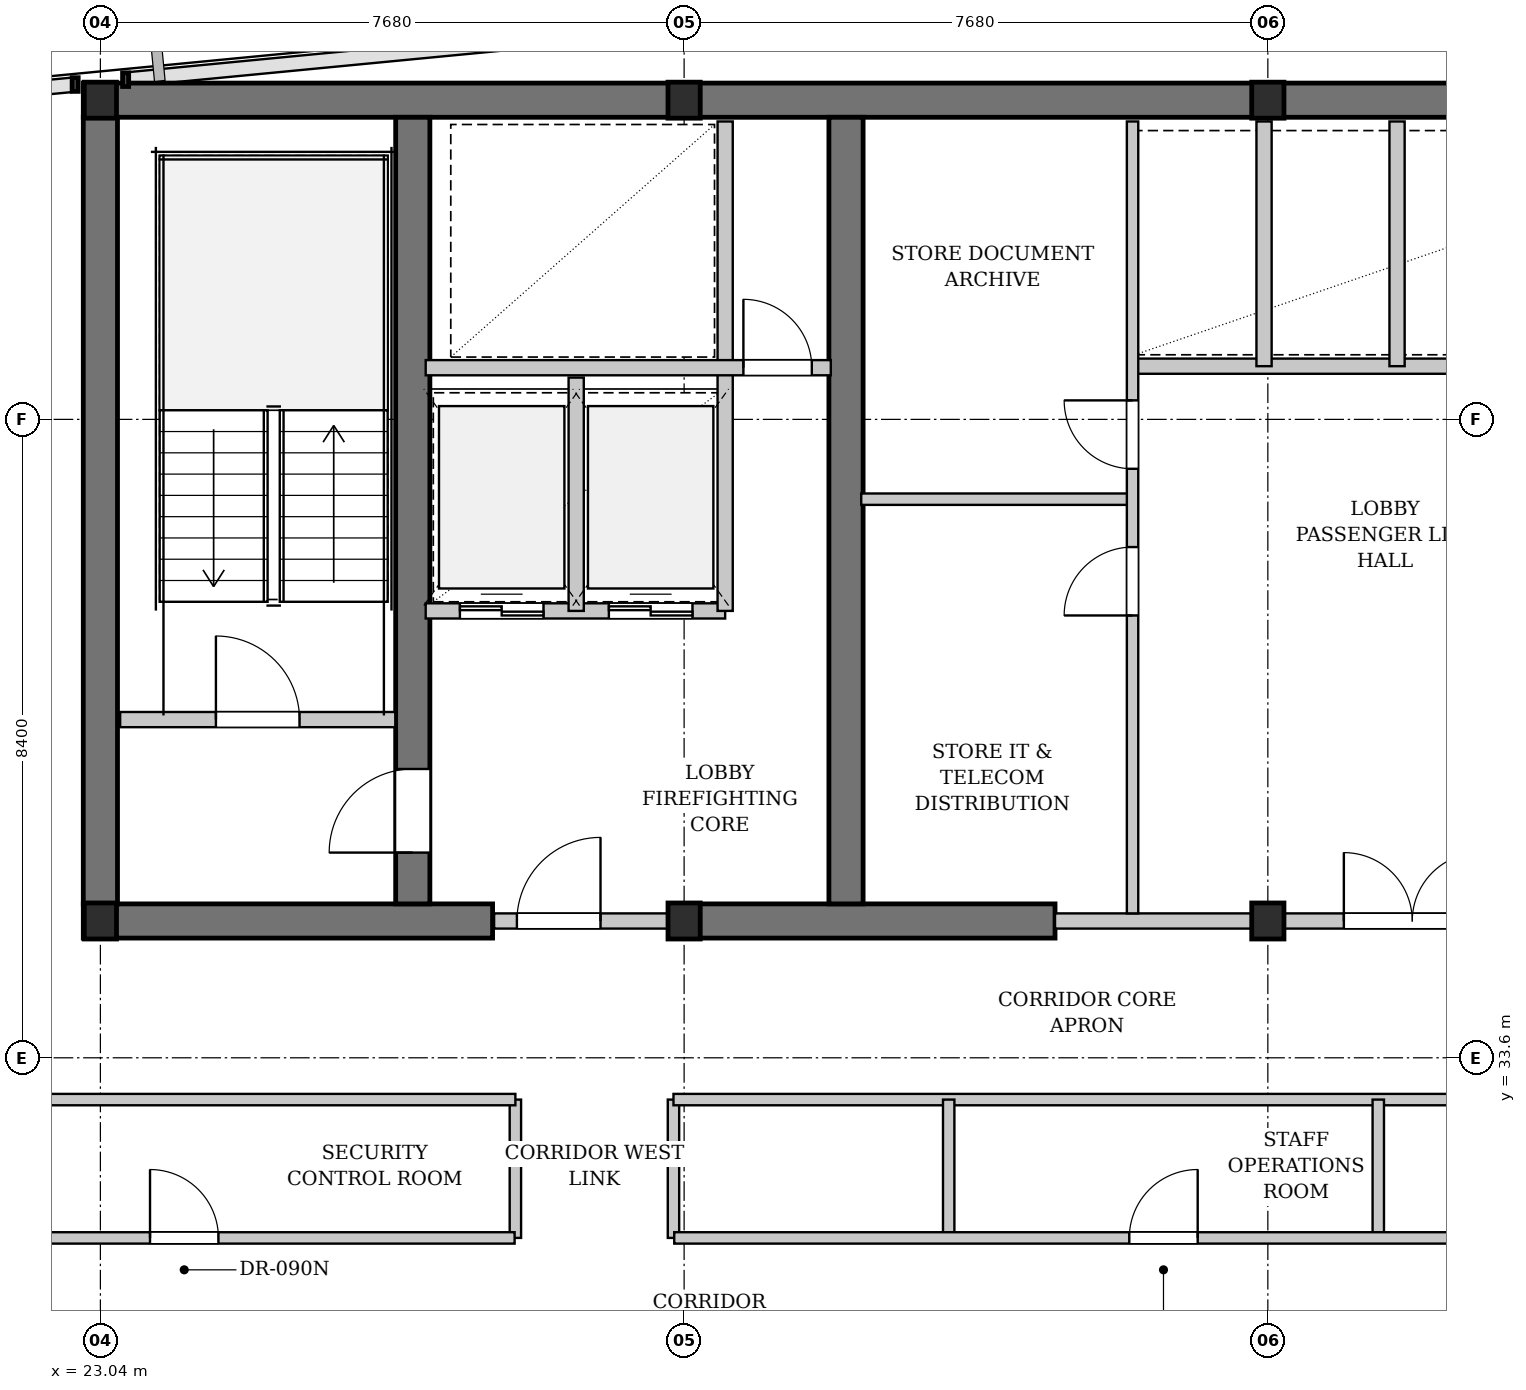
"""IFC4 building model, lengths in metres.
Left out: names, types, materials, properties, quantities, classifications, styles, units other than length and angle.
Written with IfcOpenShell. Run it as: python <this file> out.ifc"""

import sys

from ifc_helpers import new_model, si_unit, direction, frame, frame_2d, origin, origin_2d, place, context, subcontext, project, spatial, rectangle, i_section, extrude, element, fill, save


model = new_model("IFC4")
c1 = context("Model", 3, precision=1e-05, world=origin(), true_north=direction((0.0, 1.0)))
c2 = subcontext(c1, "Body", "Model", "MODEL_VIEW")
j1 = project(units=[si_unit("LENGTHUNIT", "METRE"), si_unit("PLANEANGLEUNIT", "RADIAN")], contexts=[c1])
p1 = place(None, origin())
s1 = spatial("IfcSite", under=j1, at=p1, CompositionType="ELEMENT")
p2 = place(p1, origin())
s2 = spatial("IfcBuilding", under=s1, at=p2, CompositionType="ELEMENT")
p3 = place(p2, frame((0.0, 0.0, 113.5)))
s3 = spatial("IfcBuildingStorey", under=s2, at=p3, CompositionType="ELEMENT", Elevation=113.5)
p4 = place(p3, frame((22.815, 46.2, 0.0), z_axis=(0.0, 0.0, 1.0), x_axis=(1.0, 0.0, 0.0)))
e1 = element("IfcWall", 1, at=p4, inside=s3, PredefinedType="SHEAR", context=c2, shape_type="SweptSolid", body=[
    extrude(rectangle(XDim=31.17, YDim=0.45, at=frame_2d((15.585, 0.0))), origin(), (0.0, 0.0, 1.0), 3.18),
])
p5 = place(p3, frame((22.815, 35.4, 0.0), z_axis=(0.0, 0.0, 1.0), x_axis=(1.0, 0.0, 0.0)))
e2 = element("IfcWall", 2, at=p5, inside=s3, PredefinedType="SHEAR", context=c2, shape_type="SweptSolid", body=[
    extrude(rectangle(XDim=5.385, YDim=0.45, at=frame_2d((2.692, 0.0))), origin(), (0.0, 0.0, 1.0), 3.18),
])
p6 = place(p3, frame((30.72, 35.4, 0.0), z_axis=(0.0, 0.0, 1.0), x_axis=(1.0, 0.0, 0.0)))
e3 = element("IfcWall", 3, at=p6, inside=s3, PredefinedType="SHEAR", context=c2, shape_type="SweptSolid", body=[
    extrude(rectangle(XDim=4.88, YDim=0.45, at=frame_2d((2.44, 0.0))), origin(), (0.0, 0.0, 1.0), 3.18),
])
p7 = place(p3, frame((23.04, 35.625, 0.0), z_axis=(0.0, 0.0, 1.0), x_axis=(0.0, 1.0, 0.0)))
e4 = element("IfcWall", 4, at=p7, inside=s3, PredefinedType="SHEAR", context=c2, shape_type="SweptSolid", body=[
    extrude(rectangle(XDim=10.35, YDim=0.45, at=frame_2d((5.175, 0.0))), origin(), (0.0, 0.0, 1.0), 3.18),
])
p8 = place(p3, frame((27.15, 35.625, 0.0), z_axis=(0.0, 0.0, 1.0), x_axis=(0.0, 1.0, 0.0)))
e5 = element("IfcWall", 5, at=p8, inside=s3, PredefinedType="SHEAR", context=c2, shape_type="SweptSolid", body=[
    extrude(rectangle(XDim=10.35, YDim=0.45, at=frame_2d((5.175, 0.0))), origin(), (0.0, 0.0, 1.0), 3.18),
])
p9 = place(p8, frame((0.675, 0.0, 0.0)))
e6 = element("IfcOpeningElement", 6, at=p9, cuts=e5, PredefinedType="OPENING", context=c2, shape_type="SweptSolid", body=[
    extrude(rectangle(XDim=1.1, YDim=2.15, at=frame_2d((0.55, 1.075))), frame((0.0, 0.235, 0.0), z_axis=(0.0, -1.0, 0.0), x_axis=(1.0, 0.0, 0.0)), (0.0, 0.0, 1.0), 0.47),
])
p10 = place(p3, frame((32.85, 35.625, 0.0), z_axis=(0.0, 0.0, 1.0), x_axis=(0.0, 1.0, 0.0)))
e7 = element("IfcWall", 7, at=p10, inside=s3, PredefinedType="SHEAR", context=c2, shape_type="SweptSolid", body=[
    extrude(rectangle(XDim=10.35, YDim=0.45, at=frame_2d((5.175, 0.0))), origin(), (0.0, 0.0, 1.0), 3.18),
])
for number, where, z_axis, x_axis in (
    (8, (23.04, 35.4, 0.0), (0.0, 0.0, 1.0), (1.0, 0.0, 0.0)),
    (9, (23.04, 46.2, 0.0), (0.0, 0.0, 1.0), (1.0, 0.0, 0.0)),
    (10, (30.72, 35.4, 0.0), (0.0, 0.0, 1.0), (1.0, 0.0, 0.0)),
    (11, (30.72, 46.2, 0.0), (0.0, 0.0, 1.0), (1.0, 0.0, 0.0)),
    (12, (38.4, 35.4, 0.0), (0.0, 0.0, 1.0), (1.0, 0.0, 0.0)),
    (13, (38.4, 46.2, 0.0), (0.0, 0.0, 1.0), (1.0, 0.0, 0.0)),
):
    element("IfcColumn", number, at=place(p3, frame(where, z_axis=z_axis, x_axis=x_axis)), inside=s3, PredefinedType="COLUMN", context=c2, shape_type="SweptSolid", body=[
        extrude(i_section(OverallWidth=0.424, OverallDepth=0.474, WebThickness=0.047, FlangeThickness=0.077, FilletRadius=0.015, at=origin_2d()), origin(), (0.0, 0.0, 1.0), 3.4),
    ])
p11 = place(p3, frame((23.3, 38.05, 0.0), z_axis=(0.0, 0.0, 1.0), x_axis=(1.0, 0.0, 0.0)))
e14 = element("IfcWall", 14, at=p11, inside=s3, PredefinedType="PARTITIONING", context=c2, shape_type="SweptSolid", body=[
    extrude(rectangle(XDim=3.62, YDim=0.2, at=frame_2d((1.81, 0.0))), origin(), (0.0, 0.0, 1.0), 3.18),
])
p12 = place(p11, frame((1.26, 0.0, 0.0)))
e15 = element("IfcOpeningElement", 15, at=p12, cuts=e14, PredefinedType="OPENING", context=c2, shape_type="SweptSolid", body=[
    extrude(rectangle(XDim=1.1, YDim=2.15, at=frame_2d((0.55, 1.075))), frame((0.0, 0.11, 0.0), z_axis=(0.0, -1.0, 0.0), x_axis=(1.0, 0.0, 0.0)), (0.0, 0.0, 1.0), 0.22),
])
p13 = place(p3, frame((28.22, 35.4, 0.0), z_axis=(0.0, 0.0, 1.0), x_axis=(1.0, 0.0, 0.0)))
e16 = element("IfcWall", 16, at=p13, inside=s3, PredefinedType="PARTITIONING", context=c2, shape_type="SweptSolid", body=[
    extrude(rectangle(XDim=2.5, YDim=0.2, at=frame_2d((1.25, 0.0))), origin(), (0.0, 0.0, 1.0), 2.525),
])
p14 = place(p13, frame((0.3, 0.0, 0.0)))
e17 = element("IfcOpeningElement", 17, at=p14, cuts=e16, PredefinedType="OPENING", context=c2, shape_type="SweptSolid", body=[
    extrude(rectangle(XDim=1.1, YDim=2.15, at=frame_2d((0.55, 1.075))), frame((0.0, 0.11, 0.0), z_axis=(0.0, -1.0, 0.0), x_axis=(1.0, 0.0, 0.0)), (0.0, 0.0, 1.0), 0.22),
])
p15 = place(p3, frame((27.32, 39.48, 0.0), z_axis=(0.0, 0.0, 1.0), x_axis=(1.0, 0.0, 0.0)))
e18 = element("IfcWall", 18, at=p15, inside=s3, PredefinedType="PARTITIONING", context=c2, shape_type="SweptSolid", body=[
    extrude(rectangle(XDim=3.94, YDim=0.2, at=frame_2d((1.97, 0.0))), origin(), (0.0, 0.0, 1.0), 3.18),
])
p16 = place(p15, frame((0.45, 0.0, 0.0)))
e19 = element("IfcOpeningElement", 19, at=p16, cuts=e18, PredefinedType="OPENING", context=c2, shape_type="SweptSolid", body=[
    extrude(rectangle(XDim=1.1, YDim=2.2, at=frame_2d((0.55, 1.1))), frame((0.0, 0.11, 0.0), z_axis=(0.0, -1.0, 0.0), x_axis=(1.0, 0.0, 0.0)), (0.0, 0.0, 1.0), 0.22),
])
p17 = place(p15, frame((2.41, 0.0, 0.0)))
e20 = element("IfcOpeningElement", 20, at=p17, cuts=e18, PredefinedType="OPENING", context=c2, shape_type="SweptSolid", body=[
    extrude(rectangle(XDim=1.1, YDim=2.2, at=frame_2d((0.55, 1.1))), frame((0.0, 0.11, 0.0), z_axis=(0.0, -1.0, 0.0), x_axis=(1.0, 0.0, 0.0)), (0.0, 0.0, 1.0), 0.22),
])
p18 = place(p3, frame((29.3, 39.48, 0.0), z_axis=(0.0, 0.0, 1.0), x_axis=(0.0, 1.0, 0.0)))
e21 = element("IfcWall", 21, at=p18, inside=s3, PredefinedType="PARTITIONING", context=c2, shape_type="SweptSolid", body=[
    extrude(rectangle(XDim=3.07, YDim=0.2, at=frame_2d((1.535, 0.0))), origin(), (0.0, 0.0, 1.0), 3.18),
])
p19 = place(p3, frame((31.26, 39.48, 0.0), z_axis=(0.0, 0.0, 1.0), x_axis=(0.0, 1.0, 0.0)))
e22 = element("IfcWall", 22, at=p19, inside=s3, PredefinedType="PARTITIONING", context=c2, shape_type="SweptSolid", body=[
    extrude(rectangle(XDim=6.44, YDim=0.2, at=frame_2d((3.22, 0.0))), origin(), (0.0, 0.0, 1.0), 3.18),
])
p20 = place(p3, frame((27.32, 42.68, 0.0), z_axis=(0.0, 0.0, 1.0), x_axis=(1.0, 0.0, 0.0)))
e23 = element("IfcWall", 23, at=p20, inside=s3, PredefinedType="PARTITIONING", context=c2, shape_type="SweptSolid", body=[
    extrude(rectangle(XDim=5.33, YDim=0.2, at=frame_2d((2.665, 0.0))), origin(), (0.0, 0.0, 1.0), 3.18),
])
p21 = place(p20, frame((4.18, 0.0, 0.0)))
e24 = element("IfcOpeningElement", 24, at=p21, cuts=e23, PredefinedType="OPENING", context=c2, shape_type="SweptSolid", body=[
    extrude(rectangle(XDim=0.9, YDim=2.15, at=frame_2d((0.45, 1.075))), frame((0.0, 0.11, 0.0), z_axis=(0.0, -1.0, 0.0), x_axis=(1.0, 0.0, 0.0)), (0.0, 0.0, 1.0), 0.22),
])
p22 = place(p3, frame((35.6, 35.4, 0.0), z_axis=(0.0, 0.0, 1.0), x_axis=(1.0, 0.0, 0.0)))
e25 = element("IfcWall", 25, at=p22, inside=s3, PredefinedType="PARTITIONING", context=c2, shape_type="SweptSolid", body=[
    extrude(rectangle(XDim=6.5, YDim=0.2, at=frame_2d((3.25, 0.0))), origin(), (0.0, 0.0, 1.0), 2.525),
])
p23 = place(p22, frame((3.8, 0.0, 0.0)))
e26 = element("IfcOpeningElement", 26, at=p23, cuts=e25, PredefinedType="OPENING", context=c2, shape_type="SweptSolid", body=[
    extrude(rectangle(XDim=1.8, YDim=2.3, at=frame_2d((0.9, 1.15))), frame((0.0, 0.11, 0.0), z_axis=(0.0, -1.0, 0.0), x_axis=(1.0, 0.0, 0.0)), (0.0, 0.0, 1.0), 0.22),
])
p24 = place(p3, frame((36.6, 42.7, 0.0), z_axis=(0.0, 0.0, 1.0), x_axis=(1.0, 0.0, 0.0)))
e27 = element("IfcWall", 27, at=p24, inside=s3, PredefinedType="PARTITIONING", context=c2, shape_type="SweptSolid", body=[
    extrude(rectangle(XDim=5.25, YDim=0.2, at=frame_2d((2.625, 0.0))), origin(), (0.0, 0.0, 1.0), 3.18),
])
p25 = place(p3, frame((38.35, 42.7, 0.0), z_axis=(0.0, 0.0, 1.0), x_axis=(0.0, 1.0, 0.0)))
e28 = element("IfcWall", 28, at=p25, inside=s3, PredefinedType="PARTITIONING", context=c2, shape_type="SweptSolid", body=[
    extrude(rectangle(XDim=3.22, YDim=0.2, at=frame_2d((1.61, 0.0))), origin(), (0.0, 0.0, 1.0), 2.525),
])
p26 = place(p3, frame((40.1, 42.7, 0.0), z_axis=(0.0, 0.0, 1.0), x_axis=(0.0, 1.0, 0.0)))
e29 = element("IfcWall", 29, at=p26, inside=s3, PredefinedType="PARTITIONING", context=c2, shape_type="SweptSolid", body=[
    extrude(rectangle(XDim=3.22, YDim=0.2, at=frame_2d((1.61, 0.0))), origin(), (0.0, 0.0, 1.0), 3.18),
])
p27 = place(p3, frame((33.05, 40.95, 0.0), z_axis=(0.0, 0.0, 1.0), x_axis=(1.0, 0.0, 0.0)))
e30 = element("IfcWall", 30, at=p27, inside=s3, PredefinedType="PARTITIONING", context=c2, shape_type="SweptSolid", body=[
    extrude(rectangle(XDim=3.57, YDim=0.15, at=frame_2d((1.785, 0.0))), origin(), (0.0, 0.0, 1.0), 3.18),
])
p28 = place(p3, frame((36.62, 35.5, 0.0), z_axis=(0.0, 0.0, 1.0), x_axis=(0.0, 1.0, 0.0)))
e31 = element("IfcWall", 31, at=p28, inside=s3, PredefinedType="PARTITIONING", context=c2, shape_type="SweptSolid", body=[
    extrude(rectangle(XDim=10.42, YDim=0.15, at=frame_2d((5.21, 0.0))), origin(), (0.0, 0.0, 1.0), 3.18),
])
p29 = place(p28, frame((3.92, 0.0, 0.0)))
e32 = element("IfcOpeningElement", 32, at=p29, cuts=e31, PredefinedType="OPENING", context=c2, shape_type="SweptSolid", body=[
    extrude(rectangle(XDim=0.9, YDim=2.15, at=frame_2d((0.45, 1.075))), frame((0.0, 0.085, 0.0), z_axis=(0.0, -1.0, 0.0), x_axis=(1.0, 0.0, 0.0)), (0.0, 0.0, 1.0), 0.17),
])
p30 = place(p28, frame((5.85, 0.0, 0.0)))
e33 = element("IfcOpeningElement", 33, at=p30, cuts=e31, PredefinedType="OPENING", context=c2, shape_type="SweptSolid", body=[
    extrude(rectangle(XDim=0.9, YDim=2.15, at=frame_2d((0.45, 1.075))), frame((0.0, 0.085, 0.0), z_axis=(0.0, -1.0, 0.0), x_axis=(1.0, 0.0, 0.0)), (0.0, 0.0, 1.0), 0.17),
])
p31 = place(p3, frame((28.5, 31.23, 0.0), z_axis=(0.0, 0.0, 1.0), x_axis=(0.0, 1.0, 0.0)))
e34 = element("IfcWall", 34, at=p31, inside=s3, PredefinedType="PARTITIONING", context=c2, shape_type="SweptSolid", body=[
    extrude(rectangle(XDim=1.82, YDim=0.15, at=frame_2d((0.91, 0.0))), origin(), (0.0, 0.0, 1.0), 3.18),
])
p32 = place(p3, frame((30.58, 31.23, 0.0), z_axis=(0.0, 0.0, 1.0), x_axis=(0.0, 1.0, 0.0)))
e35 = element("IfcWall", 35, at=p32, inside=s3, PredefinedType="PARTITIONING", context=c2, shape_type="SweptSolid", body=[
    extrude(rectangle(XDim=1.82, YDim=0.15, at=frame_2d((0.91, 0.0))), origin(), (0.0, 0.0, 1.0), 2.525),
])
p33 = place(p3, frame((19.776, 33.05, 0.0), z_axis=(0.0, 0.0, 1.0), x_axis=(1.0, 0.0, 0.0)))
e36 = element("IfcWall", 36, at=p33, inside=s3, PredefinedType="PARTITIONING", context=c2, shape_type="SweptSolid", body=[
    extrude(rectangle(XDim=8.724, YDim=0.15, at=frame_2d((4.362, 0.0))), origin(), (0.0, 0.0, 1.0), 3.18),
])
p34 = place(p3, frame((30.58, 33.05, 0.0), z_axis=(0.0, 0.0, 1.0), x_axis=(1.0, 0.0, 0.0)))
e37 = element("IfcWall", 37, at=p34, inside=s3, PredefinedType="PARTITIONING", context=c2, shape_type="SweptSolid", body=[
    extrude(rectangle(XDim=15.72, YDim=0.15, at=frame_2d((7.86, 0.0))), origin(), (0.0, 0.0, 1.0), 3.18),
])
p35 = place(p3, frame((19.796, 31.23, 0.0), z_axis=(0.0, 0.0, 1.0), x_axis=(1.0, 0.0, 0.0)))
e38 = element("IfcWall", 38, at=p35, inside=s3, PredefinedType="PARTITIONING", context=c2, shape_type="SweptSolid", body=[
    extrude(rectangle(XDim=8.694, YDim=0.15, at=frame_2d((4.347, 0.0))), origin(), (0.0, 0.0, 1.0), 3.18),
])
p36 = place(p35, frame((3.897, 0.0, 0.0)))
e39 = element("IfcOpeningElement", 39, at=p36, cuts=e38, PredefinedType="OPENING", context=c2, shape_type="SweptSolid", body=[
    extrude(rectangle(XDim=0.9, YDim=2.15, at=frame_2d((0.45, 1.075))), frame((0.0, 0.085, 0.0), z_axis=(0.0, -1.0, 0.0), x_axis=(1.0, 0.0, 0.0)), (0.0, 0.0, 1.0), 0.17),
])
for number, where, z_axis, x_axis in (
    (40, (34.201, 31.23, 0.0), (0.0, 0.0, 1.0), (0.0, 1.0, 0.0)),
    (41, (39.853, 31.23, 0.0), (0.0, 0.0, 1.0), (0.0, 1.0, 0.0)),
):
    element("IfcWall", number, at=place(p3, frame(where, z_axis=z_axis, x_axis=x_axis)), inside=s3, PredefinedType="PARTITIONING", context=c2, shape_type="SweptSolid", body=[
        extrude(rectangle(XDim=1.82, YDim=0.15, at=frame_2d((0.91, 0.0))), origin(), (0.0, 0.0, 1.0), 3.18),
    ])
p37 = place(p3, frame((30.59, 31.23, 0.0), z_axis=(0.0, 0.0, 1.0), x_axis=(1.0, 0.0, 0.0)))
e42 = element("IfcWall", 42, at=p37, inside=s3, PredefinedType="PARTITIONING", context=c2, shape_type="SweptSolid", body=[
    extrude(rectangle(XDim=15.7, YDim=0.15, at=frame_2d((7.85, 0.0))), origin(), (0.0, 0.0, 1.0), 3.18),
])
p38 = place(p37, frame((5.987, 0.0, 0.0)))
e43 = element("IfcOpeningElement", 43, at=p38, cuts=e42, PredefinedType="OPENING", context=c2, shape_type="SweptSolid", body=[
    extrude(rectangle(XDim=0.9, YDim=2.15, at=frame_2d((0.45, 1.075))), frame((0.0, 0.085, 0.0), z_axis=(0.0, -1.0, 0.0), x_axis=(1.0, 0.0, 0.0)), (0.0, 0.0, 1.0), 0.17),
])
p39 = place(p37, frame((12.031, 0.0, 0.0)))
e44 = element("IfcOpeningElement", 44, at=p39, cuts=e42, PredefinedType="OPENING", context=c2, shape_type="SweptSolid", body=[
    extrude(rectangle(XDim=0.9, YDim=2.15, at=frame_2d((0.45, 1.075))), frame((0.0, 0.085, 0.0), z_axis=(0.0, -1.0, 0.0), x_axis=(1.0, 0.0, 0.0)), (0.0, 0.0, 1.0), 0.17),
])
p40 = place(p12, origin())
e45 = element("IfcDoor", 45, at=p40, inside=s3, OperationType="SINGLE_SWING_LEFT", PredefinedType="DOOR", context=c2, shape_type="SweptSolid", body=[
    extrude(rectangle(XDim=1.1, YDim=2.15, at=frame_2d((0.55, 1.075))), frame((0.0, 0.025, 0.0), z_axis=(0.0, -1.0, 0.0), x_axis=(1.0, 0.0, 0.0)), (0.0, 0.0, 1.0), 0.05),
])
fill(e15, e45)
p41 = place(p14, origin())
e46 = element("IfcDoor", 46, at=p41, inside=s3, OperationType="SINGLE_SWING_RIGHT", PredefinedType="DOOR", context=c2, shape_type="SweptSolid", body=[
    extrude(rectangle(XDim=1.1, YDim=2.15, at=frame_2d((0.55, 1.075))), frame((0.0, 0.025, 0.0), z_axis=(0.0, -1.0, 0.0), x_axis=(1.0, 0.0, 0.0)), (0.0, 0.0, 1.0), 0.05),
])
fill(e17, e46)
p42 = place(p16, origin())
e47 = element("IfcDoor", 47, at=p42, inside=s3, OperationType="DOUBLE_DOOR_SLIDING", PredefinedType="DOOR", context=c2, shape_type="SweptSolid", body=[
    extrude(rectangle(XDim=1.1, YDim=2.2, at=frame_2d((0.55, 1.1))), frame((0.0, 0.025, 0.0), z_axis=(0.0, -1.0, 0.0), x_axis=(1.0, 0.0, 0.0)), (0.0, 0.0, 1.0), 0.05),
])
fill(e19, e47)
p43 = place(p17, origin())
e48 = element("IfcDoor", 48, at=p43, inside=s3, OperationType="DOUBLE_DOOR_SLIDING", PredefinedType="DOOR", context=c2, shape_type="SweptSolid", body=[
    extrude(rectangle(XDim=1.1, YDim=2.2, at=frame_2d((0.55, 1.1))), frame((0.0, 0.025, 0.0), z_axis=(0.0, -1.0, 0.0), x_axis=(1.0, 0.0, 0.0)), (0.0, 0.0, 1.0), 0.05),
])
fill(e20, e48)
p44 = place(p21, origin())
e49 = element("IfcDoor", 49, at=p44, inside=s3, OperationType="SINGLE_SWING_LEFT", PredefinedType="DOOR", context=c2, shape_type="SweptSolid", body=[
    extrude(rectangle(XDim=0.9, YDim=2.15, at=frame_2d((0.45, 1.075))), frame((0.0, 0.025, 0.0), z_axis=(0.0, -1.0, 0.0), x_axis=(1.0, 0.0, 0.0)), (0.0, 0.0, 1.0), 0.05),
])
fill(e24, e49)
p45 = place(p23, origin())
e50 = element("IfcDoor", 50, at=p45, inside=s3, OperationType="DOUBLE_DOOR_SINGLE_SWING", PredefinedType="DOOR", context=c2, shape_type="SweptSolid", body=[
    extrude(rectangle(XDim=1.8, YDim=2.3, at=frame_2d((0.9, 1.15))), frame((0.0, 0.025, 0.0), z_axis=(0.0, -1.0, 0.0), x_axis=(1.0, 0.0, 0.0)), (0.0, 0.0, 1.0), 0.05),
])
fill(e26, e50)
p46 = place(p29, origin())
e51 = element("IfcDoor", 51, at=p46, inside=s3, OperationType="SINGLE_SWING_LEFT", PredefinedType="DOOR", context=c2, shape_type="SweptSolid", body=[
    extrude(rectangle(XDim=0.9, YDim=2.15, at=frame_2d((0.45, 1.075))), frame((0.0, 0.025, 0.0), z_axis=(0.0, -1.0, 0.0), x_axis=(1.0, 0.0, 0.0)), (0.0, 0.0, 1.0), 0.05),
])
fill(e32, e51)
p47 = place(p30, origin())
e52 = element("IfcDoor", 52, at=p47, inside=s3, OperationType="SINGLE_SWING_RIGHT", PredefinedType="DOOR", context=c2, shape_type="SweptSolid", body=[
    extrude(rectangle(XDim=0.9, YDim=2.15, at=frame_2d((0.45, 1.075))), frame((0.0, 0.025, 0.0), z_axis=(0.0, -1.0, 0.0), x_axis=(1.0, 0.0, 0.0)), (0.0, 0.0, 1.0), 0.05),
])
fill(e33, e52)
p48 = place(p36, origin())
e53 = element("IfcDoor", 53, at=p48, inside=s3, OperationType="SINGLE_SWING_LEFT", PredefinedType="DOOR", context=c2, shape_type="SweptSolid", body=[
    extrude(rectangle(XDim=0.9, YDim=2.15, at=frame_2d((0.45, 1.075))), frame((0.0, 0.025, 0.0), z_axis=(0.0, -1.0, 0.0), x_axis=(1.0, 0.0, 0.0)), (0.0, 0.0, 1.0), 0.05),
])
fill(e39, e53)
p49 = place(p38, origin())
e54 = element("IfcDoor", 54, at=p49, inside=s3, OperationType="SINGLE_SWING_RIGHT", PredefinedType="DOOR", context=c2, shape_type="SweptSolid", body=[
    extrude(rectangle(XDim=0.9, YDim=2.15, at=frame_2d((0.45, 1.075))), frame((0.0, 0.025, 0.0), z_axis=(0.0, -1.0, 0.0), x_axis=(1.0, 0.0, 0.0)), (0.0, 0.0, 1.0), 0.05),
])
fill(e43, e54)
p50 = place(p9, origin())
e55 = element("IfcDoor", 55, at=p50, inside=s3, OperationType="SINGLE_SWING_LEFT", PredefinedType="DOOR", context=c2, shape_type="SweptSolid", body=[
    extrude(rectangle(XDim=1.1, YDim=2.15, at=frame_2d((0.55, 1.075))), frame((0.0, 0.025, 0.0), z_axis=(0.0, -1.0, 0.0), x_axis=(1.0, 0.0, 0.0)), (0.0, 0.0, 1.0), 0.05),
])
fill(e6, e55)
save(model, sys.argv[1])
